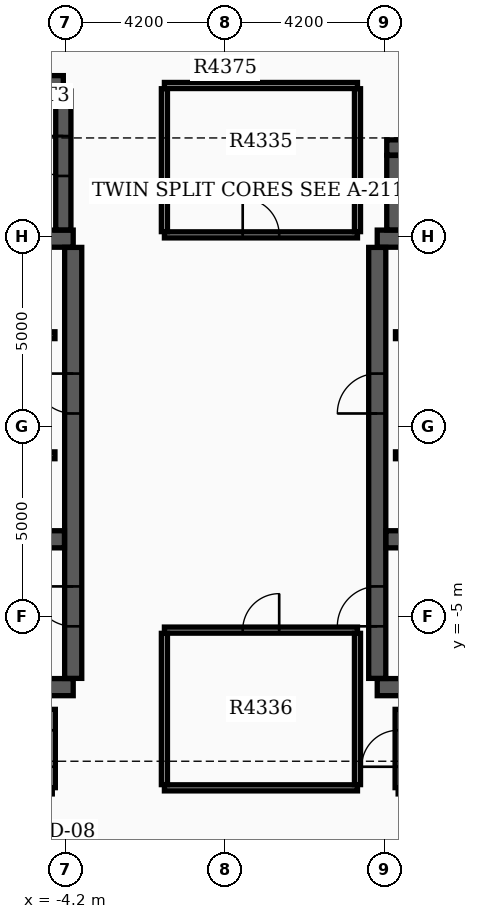
"""IFC4 building model, lengths in metres.
Left out: names, types, materials, properties, quantities, classifications, styles, units other than length and angle.
Written with IfcOpenShell. Run it as: python <this file> out.ifc"""

import sys

from ifc_helpers import new_model, si_unit, direction, frame, frame_2d, origin, place, context, subcontext, project, spatial, rectangle, extrude, element, fill, save


model = new_model("IFC4")
c1 = context("Model", 3, precision=1e-05, world=origin(), true_north=direction((0.0, 1.0)))
c2 = subcontext(c1, "Body", "Model", "MODEL_VIEW")
j1 = project(units=[si_unit("LENGTHUNIT", "METRE"), si_unit("PLANEANGLEUNIT", "RADIAN")], contexts=[c1])
p1 = place(None, origin())
s1 = spatial("IfcSite", under=j1, at=p1, CompositionType="ELEMENT")
p2 = place(p1, origin())
s2 = spatial("IfcBuilding", under=s1, at=p2, CompositionType="ELEMENT")
p3 = place(p2, frame((0.0, 0.0, 273.3)))
s3 = spatial("IfcBuildingStorey", under=s2, at=p3, CompositionType="ELEMENT", Elevation=273.3)
for number, where, z_axis, x_axis in (
    (1, (-12.4, -6.85, 0.0), (0.0, 0.0, 1.0), (1.0, 0.0, 0.0)),
    (2, (-12.4, 4.95, 0.0), (0.0, 0.0, 1.0), (1.0, 0.0, 0.0)),
):
    element("IfcWall", number, at=place(p3, frame(where, z_axis=z_axis, x_axis=x_axis)), inside=s3, PredefinedType="SHEAR", context=c2, shape_type="SweptSolid", body=[
        extrude(rectangle(XDim=8.4, YDim=0.45, at=frame_2d((4.2, 0.0))), origin(), (0.0, 0.0, 1.0), 3.7),
    ])
p4 = place(p3, frame((-4.0, -6.62, 0.0), z_axis=(0.0, 0.0, 1.0), x_axis=(0.0, 1.0, 0.0)))
e3 = element("IfcWall", 3, at=p4, inside=s3, PredefinedType="SHEAR", context=c2, shape_type="SweptSolid", body=[
    extrude(rectangle(XDim=11.34, YDim=0.45, at=frame_2d((5.67, 0.0))), origin(), (0.0, 0.0, 1.0), 3.7),
])
p5 = place(p4, frame((1.37, 0.0, 0.0)))
e4 = element("IfcOpeningElement", 4, at=p5, cuts=e3, PredefinedType="OPENING", context=c2, shape_type="SweptSolid", body=[
    extrude(rectangle(XDim=1.05, YDim=2.15, at=frame_2d((0.525, 1.075))), frame((0.0, 0.235, 0.0), z_axis=(0.0, -1.0, 0.0), x_axis=(1.0, 0.0, 0.0)), (0.0, 0.0, 1.0), 0.47),
])
p6 = place(p4, frame((6.97, 0.0, 0.0)))
e5 = element("IfcOpeningElement", 5, at=p6, cuts=e3, PredefinedType="OPENING", context=c2, shape_type="SweptSolid", body=[
    extrude(rectangle(XDim=1.05, YDim=2.15, at=frame_2d((0.525, 1.075))), frame((0.0, 0.235, 0.0), z_axis=(0.0, -1.0, 0.0), x_axis=(1.0, 0.0, 0.0)), (0.0, 0.0, 1.0), 0.47),
])
p7 = place(p3, frame((-12.17, -2.96, 0.0), z_axis=(0.0, 0.0, 1.0), x_axis=(1.0, 0.0, 0.0)))
e6 = element("IfcWall", 6, at=p7, inside=s3, PredefinedType="SHEAR", context=c2, shape_type="SweptSolid", body=[
    extrude(rectangle(XDim=7.94, YDim=0.45, at=frame_2d((3.97, 0.0))), origin(), (0.0, 0.0, 1.0), 3.7),
])
for number, where, z_axis, x_axis in (
    (7, (4.0, -6.85, 0.0), (0.0, 0.0, 1.0), (1.0, 0.0, 0.0)),
    (8, (4.0, 4.95, 0.0), (0.0, 0.0, 1.0), (1.0, 0.0, 0.0)),
):
    element("IfcWall", number, at=place(p3, frame(where, z_axis=z_axis, x_axis=x_axis)), inside=s3, PredefinedType="SHEAR", context=c2, shape_type="SweptSolid", body=[
        extrude(rectangle(XDim=8.4, YDim=0.45, at=frame_2d((4.2, 0.0))), origin(), (0.0, 0.0, 1.0), 3.7),
    ])
p8 = place(p3, frame((4.0, -6.62, 0.0), z_axis=(0.0, 0.0, 1.0), x_axis=(0.0, 1.0, 0.0)))
e9 = element("IfcWall", 9, at=p8, inside=s3, PredefinedType="SHEAR", context=c2, shape_type="SweptSolid", body=[
    extrude(rectangle(XDim=11.34, YDim=0.45, at=frame_2d((5.67, 0.0))), origin(), (0.0, 0.0, 1.0), 3.7),
])
p9 = place(p8, frame((1.37, 0.0, 0.0)))
e10 = element("IfcOpeningElement", 10, at=p9, cuts=e9, PredefinedType="OPENING", context=c2, shape_type="SweptSolid", body=[
    extrude(rectangle(XDim=1.05, YDim=2.15, at=frame_2d((0.525, 1.075))), frame((0.0, 0.235, 0.0), z_axis=(0.0, -1.0, 0.0), x_axis=(1.0, 0.0, 0.0)), (0.0, 0.0, 1.0), 0.47),
])
p10 = place(p8, frame((6.97, 0.0, 0.0)))
e11 = element("IfcOpeningElement", 11, at=p10, cuts=e9, PredefinedType="OPENING", context=c2, shape_type="SweptSolid", body=[
    extrude(rectangle(XDim=1.05, YDim=2.15, at=frame_2d((0.525, 1.075))), frame((0.0, 0.235, 0.0), z_axis=(0.0, -1.0, 0.0), x_axis=(1.0, 0.0, 0.0)), (0.0, 0.0, 1.0), 0.47),
])
p11 = place(p3, frame((4.23, -2.96, 0.0), z_axis=(0.0, 0.0, 1.0), x_axis=(1.0, 0.0, 0.0)))
e12 = element("IfcWall", 12, at=p11, inside=s3, PredefinedType="SHEAR", context=c2, shape_type="SweptSolid", body=[
    extrude(rectangle(XDim=7.94, YDim=0.45, at=frame_2d((3.97, 0.0))), origin(), (0.0, 0.0, 1.0), 3.7),
])
p12 = place(p3, frame((-12.22, 9.04, 0.0), z_axis=(0.0, 0.0, 1.0), x_axis=(1.0, 0.0, 0.0)))
e13 = element("IfcWall", 13, at=p12, inside=s3, PredefinedType="SHEAR", context=c2, shape_type="SweptSolid", body=[
    extrude(rectangle(XDim=7.96, YDim=0.4, at=frame_2d((3.98, 0.0))), origin(), (0.0, 0.0, 1.0), 3.7),
])
p13 = place(p3, frame((-4.26, 5.18, 0.0), z_axis=(0.0, 0.0, 1.0), x_axis=(0.0, 1.0, 0.0)))
e14 = element("IfcWall", 14, at=p13, inside=s3, PredefinedType="SHEAR", context=c2, shape_type="SweptSolid", body=[
    extrude(rectangle(XDim=3.655, YDim=0.4, at=frame_2d((1.828, 0.0))), origin(), (0.0, 0.0, 1.0), 3.7),
])
p14 = place(p13, frame((1.42, 0.0, 0.0)))
e15 = element("IfcOpeningElement", 15, at=p14, cuts=e14, PredefinedType="OPENING", context=c2, shape_type="SweptSolid", body=[
    extrude(rectangle(XDim=1.05, YDim=2.15, at=frame_2d((0.525, 1.075))), frame((0.0, 0.21, 0.0), z_axis=(0.0, -1.0, 0.0), x_axis=(1.0, 0.0, 0.0)), (0.0, 0.0, 1.0), 0.42),
])
p15 = place(p3, frame((4.45, 5.18, 0.0), z_axis=(0.0, 0.0, 1.0), x_axis=(0.0, 1.0, 0.0)))
e16 = element("IfcWall", 16, at=p15, inside=s3, PredefinedType="SHEAR", context=c2, shape_type="SweptSolid", body=[
    extrude(rectangle(XDim=1.96, YDim=0.4, at=frame_2d((0.98, 0.0))), origin(), (0.0, 0.0, 1.0), 3.7),
])
p16 = place(p3, frame((4.25, 7.35, 0.0), z_axis=(0.0, 0.0, 1.0), x_axis=(1.0, 0.0, 0.0)))
e17 = element("IfcWall", 17, at=p16, inside=s3, PredefinedType="SHEAR", context=c2, shape_type="SweptSolid", body=[
    extrude(rectangle(XDim=5.4, YDim=0.4, at=frame_2d((2.7, 0.0))), origin(), (0.0, 0.0, 1.0), 3.7),
])
p17 = place(p3, frame((-11.9, 2.41, 0.0), z_axis=(0.0, 0.0, 1.0), x_axis=(1.0, 0.0, 0.0)))
e18 = element("IfcWall", 18, at=p17, inside=s3, PredefinedType="SOLIDWALL", context=c2, shape_type="SweptSolid", body=[
    extrude(rectangle(XDim=7.42, YDim=0.18, at=frame_2d((3.71, 0.0))), origin(), (0.0, 0.0, 1.0), 3.17),
])
p18 = place(p17, frame((0.55, 0.0, 0.0)))
e19 = element("IfcOpeningElement", 19, at=p18, cuts=e18, PredefinedType="OPENING", context=c2, shape_type="SweptSolid", body=[
    extrude(rectangle(XDim=1.1, YDim=2.15, at=frame_2d((0.55, 1.075))), frame((0.0, 0.1, 0.0), z_axis=(0.0, -1.0, 0.0), x_axis=(1.0, 0.0, 0.0)), (0.0, 0.0, 1.0), 0.2),
])
p19 = place(p17, frame((4.9, 0.0, 0.0)))
e20 = element("IfcOpeningElement", 20, at=p19, cuts=e18, PredefinedType="OPENING", context=c2, shape_type="SweptSolid", body=[
    extrude(rectangle(XDim=0.88, YDim=2.1, at=frame_2d((0.44, 1.05))), frame((0.0, 0.1, 0.0), z_axis=(0.0, -1.0, 0.0), x_axis=(1.0, 0.0, 0.0)), (0.0, 0.0, 1.0), 0.2),
])
p20 = place(p3, frame((4.48, 2.41, 0.0), z_axis=(0.0, 0.0, 1.0), x_axis=(1.0, 0.0, 0.0)))
e21 = element("IfcWall", 21, at=p20, inside=s3, PredefinedType="SOLIDWALL", context=c2, shape_type="SweptSolid", body=[
    extrude(rectangle(XDim=7.42, YDim=0.18, at=frame_2d((3.71, 0.0))), origin(), (0.0, 0.0, 1.0), 3.17),
])
p21 = place(p20, frame((5.67, 0.0, 0.0)))
e22 = element("IfcOpeningElement", 22, at=p21, cuts=e21, PredefinedType="OPENING", context=c2, shape_type="SweptSolid", body=[
    extrude(rectangle(XDim=1.1, YDim=2.15, at=frame_2d((0.55, 1.075))), frame((0.0, 0.1, 0.0), z_axis=(0.0, -1.0, 0.0), x_axis=(1.0, 0.0, 0.0)), (0.0, 0.0, 1.0), 0.2),
])
p22 = place(p20, frame((1.6, 0.0, 0.0)))
e23 = element("IfcOpeningElement", 23, at=p22, cuts=e21, PredefinedType="OPENING", context=c2, shape_type="SweptSolid", body=[
    extrude(rectangle(XDim=0.88, YDim=2.1, at=frame_2d((0.44, 1.05))), frame((0.0, 0.1, 0.0), z_axis=(0.0, -1.0, 0.0), x_axis=(1.0, 0.0, 0.0)), (0.0, 0.0, 1.0), 0.2),
])
p23 = place(p3, frame((-11.9, -0.75, 0.0), z_axis=(0.0, 0.0, 1.0), x_axis=(1.0, 0.0, 0.0)))
e24 = element("IfcWall", 24, at=p23, inside=s3, PredefinedType="SOLIDWALL", context=c2, shape_type="SweptSolid", body=[
    extrude(rectangle(XDim=7.42, YDim=0.18, at=frame_2d((3.71, 0.0))), origin(), (0.0, 0.0, 1.0), 3.17),
])
p24 = place(p23, frame((5.75, 0.0, 0.0)))
e25 = element("IfcOpeningElement", 25, at=p24, cuts=e24, PredefinedType="OPENING", context=c2, shape_type="SweptSolid", body=[
    extrude(rectangle(XDim=1.1, YDim=2.15, at=frame_2d((0.55, 1.075))), frame((0.0, 0.1, 0.0), z_axis=(0.0, -1.0, 0.0), x_axis=(1.0, 0.0, 0.0)), (0.0, 0.0, 1.0), 0.2),
])
p25 = place(p23, frame((1.6, 0.0, 0.0)))
e26 = element("IfcOpeningElement", 26, at=p25, cuts=e24, PredefinedType="OPENING", context=c2, shape_type="SweptSolid", body=[
    extrude(rectangle(XDim=0.88, YDim=2.1, at=frame_2d((0.44, 1.05))), frame((0.0, 0.1, 0.0), z_axis=(0.0, -1.0, 0.0), x_axis=(1.0, 0.0, 0.0)), (0.0, 0.0, 1.0), 0.2),
])
p26 = place(p3, frame((4.48, -0.75, 0.0), z_axis=(0.0, 0.0, 1.0), x_axis=(1.0, 0.0, 0.0)))
e27 = element("IfcWall", 27, at=p26, inside=s3, PredefinedType="SOLIDWALL", context=c2, shape_type="SweptSolid", body=[
    extrude(rectangle(XDim=7.42, YDim=0.18, at=frame_2d((3.71, 0.0))), origin(), (0.0, 0.0, 1.0), 3.17),
])
p27 = place(p26, frame((3.92, 0.0, 0.0)))
e28 = element("IfcOpeningElement", 28, at=p27, cuts=e27, PredefinedType="OPENING", context=c2, shape_type="SweptSolid", body=[
    extrude(rectangle(XDim=1.1, YDim=2.15, at=frame_2d((0.55, 1.075))), frame((0.0, 0.1, 0.0), z_axis=(0.0, -1.0, 0.0), x_axis=(1.0, 0.0, 0.0)), (0.0, 0.0, 1.0), 0.2),
])
p28 = place(p26, frame((5.82, 0.0, 0.0)))
e29 = element("IfcOpeningElement", 29, at=p28, cuts=e27, PredefinedType="OPENING", context=c2, shape_type="SweptSolid", body=[
    extrude(rectangle(XDim=1.1, YDim=2.15, at=frame_2d((0.55, 1.075))), frame((0.0, 0.1, 0.0), z_axis=(0.0, -1.0, 0.0), x_axis=(1.0, 0.0, 0.0)), (0.0, 0.0, 1.0), 0.2),
])
p29 = place(p26, frame((1.6, 0.0, 0.0)))
e30 = element("IfcOpeningElement", 30, at=p29, cuts=e27, PredefinedType="OPENING", context=c2, shape_type="SweptSolid", body=[
    extrude(rectangle(XDim=0.88, YDim=2.1, at=frame_2d((0.44, 1.05))), frame((0.0, 0.1, 0.0), z_axis=(0.0, -1.0, 0.0), x_axis=(1.0, 0.0, 0.0)), (0.0, 0.0, 1.0), 0.2),
])
p30 = place(p3, frame((-1.6, 5.05, 0.0), z_axis=(0.0, 0.0, 1.0), x_axis=(1.0, 0.0, 0.0)))
e31 = element("IfcWall", 31, at=p30, inside=s3, PredefinedType="PARTITIONING", context=c2, shape_type="SweptSolid", body=[
    extrude(rectangle(XDim=5.08, YDim=0.16, at=frame_2d((2.54, 0.0))), origin(), (0.0, 0.0, 1.0), 3.17),
])
p31 = place(p30, frame((2.06, 0.0, 0.0)))
e32 = element("IfcOpeningElement", 32, at=p31, cuts=e31, PredefinedType="OPENING", context=c2, shape_type="SweptSolid", body=[
    extrude(rectangle(XDim=0.96, YDim=2.15, at=frame_2d((0.48, 1.075))), frame((0.0, 0.09, 0.0), z_axis=(0.0, -1.0, 0.0), x_axis=(1.0, 0.0, 0.0)), (0.0, 0.0, 1.0), 0.18),
])
p32 = place(p3, frame((-1.6, 8.98, 0.0), z_axis=(0.0, 0.0, 1.0), x_axis=(1.0, 0.0, 0.0)))
e33 = element("IfcWall", 33, at=p32, inside=s3, PredefinedType="PARTITIONING", context=c2, shape_type="SweptSolid", body=[
    extrude(rectangle(XDim=5.08, YDim=0.16, at=frame_2d((2.54, 0.0))), origin(), (0.0, 0.0, 1.0), 3.17),
])
for number, where, z_axis, x_axis in (
    (34, (-1.6, 5.135, 0.0), (0.0, 0.0, 1.0), (0.0, 1.0, 0.0)),
    (35, (3.48, 5.135, 0.0), (0.0, 0.0, 1.0), (0.0, 1.0, 0.0)),
):
    element("IfcWall", number, at=place(p3, frame(where, z_axis=z_axis, x_axis=x_axis)), inside=s3, PredefinedType="PARTITIONING", context=c2, shape_type="SweptSolid", body=[
        extrude(rectangle(XDim=3.76, YDim=0.16, at=frame_2d((1.88, 0.0))), origin(), (0.0, 0.0, 1.0), 3.17),
    ])
p33 = place(p3, frame((-1.6, -9.5, 0.0), z_axis=(0.0, 0.0, 1.0), x_axis=(1.0, 0.0, 0.0)))
e36 = element("IfcWall", 36, at=p33, inside=s3, PredefinedType="PARTITIONING", context=c2, shape_type="SweptSolid", body=[
    extrude(rectangle(XDim=5.08, YDim=0.16, at=frame_2d((2.54, 0.0))), origin(), (0.0, 0.0, 1.0), 3.17),
])
p34 = place(p3, frame((-1.6, -5.35, 0.0), z_axis=(0.0, 0.0, 1.0), x_axis=(1.0, 0.0, 0.0)))
e37 = element("IfcWall", 37, at=p34, inside=s3, PredefinedType="PARTITIONING", context=c2, shape_type="SweptSolid", body=[
    extrude(rectangle(XDim=5.08, YDim=0.16, at=frame_2d((2.54, 0.0))), origin(), (0.0, 0.0, 1.0), 3.17),
])
p35 = place(p34, frame((2.06, 0.0, 0.0)))
e38 = element("IfcOpeningElement", 38, at=p35, cuts=e37, PredefinedType="OPENING", context=c2, shape_type="SweptSolid", body=[
    extrude(rectangle(XDim=0.96, YDim=2.15, at=frame_2d((0.48, 1.075))), frame((0.0, 0.09, 0.0), z_axis=(0.0, -1.0, 0.0), x_axis=(1.0, 0.0, 0.0)), (0.0, 0.0, 1.0), 0.18),
])
for number, where, z_axis, x_axis in (
    (39, (-1.6, -9.415, 0.0), (0.0, 0.0, 1.0), (0.0, 1.0, 0.0)),
    (40, (3.48, -9.415, 0.0), (0.0, 0.0, 1.0), (0.0, 1.0, 0.0)),
):
    element("IfcWall", number, at=place(p3, frame(where, z_axis=z_axis, x_axis=x_axis)), inside=s3, PredefinedType="PARTITIONING", context=c2, shape_type="SweptSolid", body=[
        extrude(rectangle(XDim=3.98, YDim=0.16, at=frame_2d((1.99, 0.0))), origin(), (0.0, 0.0, 1.0), 3.17),
    ])
p36 = place(p3, frame((4.55, -9.58, 0.0), z_axis=(0.0, 0.0, 1.0), x_axis=(1.0, 0.0, 0.0)))
e41 = element("IfcWall", 41, at=p36, inside=s3, PredefinedType="PARTITIONING", context=c2, shape_type="SweptSolid", body=[
    extrude(rectangle(XDim=8.1, YDim=0.16, at=frame_2d((4.05, 0.0))), origin(), (0.0, 0.0, 1.0), 3.17),
])
p37 = place(p3, frame((4.55, -9.495, 0.0), z_axis=(0.0, 0.0, 1.0), x_axis=(0.0, 1.0, 0.0)))
e42 = element("IfcWall", 42, at=p37, inside=s3, PredefinedType="PARTITIONING", context=c2, shape_type="SweptSolid", body=[
    extrude(rectangle(XDim=2.06, YDim=0.16, at=frame_2d((1.03, 0.0))), origin(), (0.0, 0.0, 1.0), 3.17),
])
p38 = place(p37, frame((0.55, 0.0, 0.0)))
e43 = element("IfcOpeningElement", 43, at=p38, cuts=e42, PredefinedType="OPENING", context=c2, shape_type="SweptSolid", body=[
    extrude(rectangle(XDim=0.96, YDim=2.15, at=frame_2d((0.48, 1.075))), frame((0.0, 0.09, 0.0), z_axis=(0.0, -1.0, 0.0), x_axis=(1.0, 0.0, 0.0)), (0.0, 0.0, 1.0), 0.18),
])
p39 = place(p3, frame((-4.55, -9.495, 0.0), z_axis=(0.0, 0.0, 1.0), x_axis=(0.0, 1.0, 0.0)))
e44 = element("IfcWall", 44, at=p39, inside=s3, PredefinedType="PARTITIONING", context=c2, shape_type="SweptSolid", body=[
    extrude(rectangle(XDim=2.06, YDim=0.16, at=frame_2d((1.03, 0.0))), origin(), (0.0, 0.0, 1.0), 3.17),
])
p40 = place(p39, frame((0.55, 0.0, 0.0)))
e45 = element("IfcOpeningElement", 45, at=p40, cuts=e44, PredefinedType="OPENING", context=c2, shape_type="SweptSolid", body=[
    extrude(rectangle(XDim=0.96, YDim=2.15, at=frame_2d((0.48, 1.075))), frame((0.0, 0.09, 0.0), z_axis=(0.0, -1.0, 0.0), x_axis=(1.0, 0.0, 0.0)), (0.0, 0.0, 1.0), 0.18),
])
p41 = place(p5, origin())
e46 = element("IfcDoor", 46, at=p41, inside=s3, OperationType="SINGLE_SWING_RIGHT", PredefinedType="DOOR", context=c2, shape_type="SweptSolid", body=[
    extrude(rectangle(XDim=1.05, YDim=2.15, at=frame_2d((0.525, 1.075))), frame((0.0, 0.025, 0.0), z_axis=(0.0, -1.0, 0.0), x_axis=(1.0, 0.0, 0.0)), (0.0, 0.0, 1.0), 0.05),
])
fill(e4, e46)
p42 = place(p9, origin())
e47 = element("IfcDoor", 47, at=p42, inside=s3, OperationType="SINGLE_SWING_LEFT", PredefinedType="DOOR", context=c2, shape_type="SweptSolid", body=[
    extrude(rectangle(XDim=1.05, YDim=2.15, at=frame_2d((0.525, 1.075))), frame((0.0, 0.025, 0.0), z_axis=(0.0, -1.0, 0.0), x_axis=(1.0, 0.0, 0.0)), (0.0, 0.0, 1.0), 0.05),
])
fill(e10, e47)
p43 = place(p6, origin())
e48 = element("IfcDoor", 48, at=p43, inside=s3, OperationType="SINGLE_SWING_RIGHT", PredefinedType="DOOR", context=c2, shape_type="SweptSolid", body=[
    extrude(rectangle(XDim=1.05, YDim=2.15, at=frame_2d((0.525, 1.075))), frame((0.0, 0.025, 0.0), z_axis=(0.0, -1.0, 0.0), x_axis=(1.0, 0.0, 0.0)), (0.0, 0.0, 1.0), 0.05),
])
fill(e5, e48)
p44 = place(p10, origin())
e49 = element("IfcDoor", 49, at=p44, inside=s3, OperationType="SINGLE_SWING_LEFT", PredefinedType="DOOR", context=c2, shape_type="SweptSolid", body=[
    extrude(rectangle(XDim=1.05, YDim=2.15, at=frame_2d((0.525, 1.075))), frame((0.0, 0.025, 0.0), z_axis=(0.0, -1.0, 0.0), x_axis=(1.0, 0.0, 0.0)), (0.0, 0.0, 1.0), 0.05),
])
fill(e11, e49)
p45 = place(p14, origin())
e50 = element("IfcDoor", 50, at=p45, inside=s3, OperationType="SINGLE_SWING_RIGHT", PredefinedType="DOOR", context=c2, shape_type="SweptSolid", body=[
    extrude(rectangle(XDim=1.05, YDim=2.15, at=frame_2d((0.525, 1.075))), frame((0.0, 0.025, 0.0), z_axis=(0.0, -1.0, 0.0), x_axis=(1.0, 0.0, 0.0)), (0.0, 0.0, 1.0), 0.05),
])
fill(e15, e50)
p46 = place(p31, origin())
e51 = element("IfcDoor", 51, at=p46, inside=s3, OperationType="SINGLE_SWING_LEFT", PredefinedType="DOOR", context=c2, shape_type="SweptSolid", body=[
    extrude(rectangle(XDim=0.96, YDim=2.15, at=frame_2d((0.48, 1.075))), frame((0.0, 0.025, 0.0), z_axis=(0.0, -1.0, 0.0), x_axis=(1.0, 0.0, 0.0)), (0.0, 0.0, 1.0), 0.05),
])
fill(e32, e51)
p47 = place(p35, origin())
e52 = element("IfcDoor", 52, at=p47, inside=s3, OperationType="SINGLE_SWING_RIGHT", PredefinedType="DOOR", context=c2, shape_type="SweptSolid", body=[
    extrude(rectangle(XDim=0.96, YDim=2.15, at=frame_2d((0.48, 1.075))), frame((0.0, 0.025, 0.0), z_axis=(0.0, -1.0, 0.0), x_axis=(1.0, 0.0, 0.0)), (0.0, 0.0, 1.0), 0.05),
])
fill(e38, e52)
p48 = place(p38, origin())
e53 = element("IfcDoor", 53, at=p48, inside=s3, OperationType="SINGLE_SWING_LEFT", PredefinedType="DOOR", context=c2, shape_type="SweptSolid", body=[
    extrude(rectangle(XDim=0.96, YDim=2.15, at=frame_2d((0.48, 1.075))), frame((0.0, 0.025, 0.0), z_axis=(0.0, -1.0, 0.0), x_axis=(1.0, 0.0, 0.0)), (0.0, 0.0, 1.0), 0.05),
])
fill(e43, e53)
p49 = place(p40, origin())
e54 = element("IfcDoor", 54, at=p49, inside=s3, OperationType="SINGLE_SWING_RIGHT", PredefinedType="DOOR", context=c2, shape_type="SweptSolid", body=[
    extrude(rectangle(XDim=0.96, YDim=2.15, at=frame_2d((0.48, 1.075))), frame((0.0, 0.025, 0.0), z_axis=(0.0, -1.0, 0.0), x_axis=(1.0, 0.0, 0.0)), (0.0, 0.0, 1.0), 0.05),
])
fill(e45, e54)
save(model, sys.argv[1])
